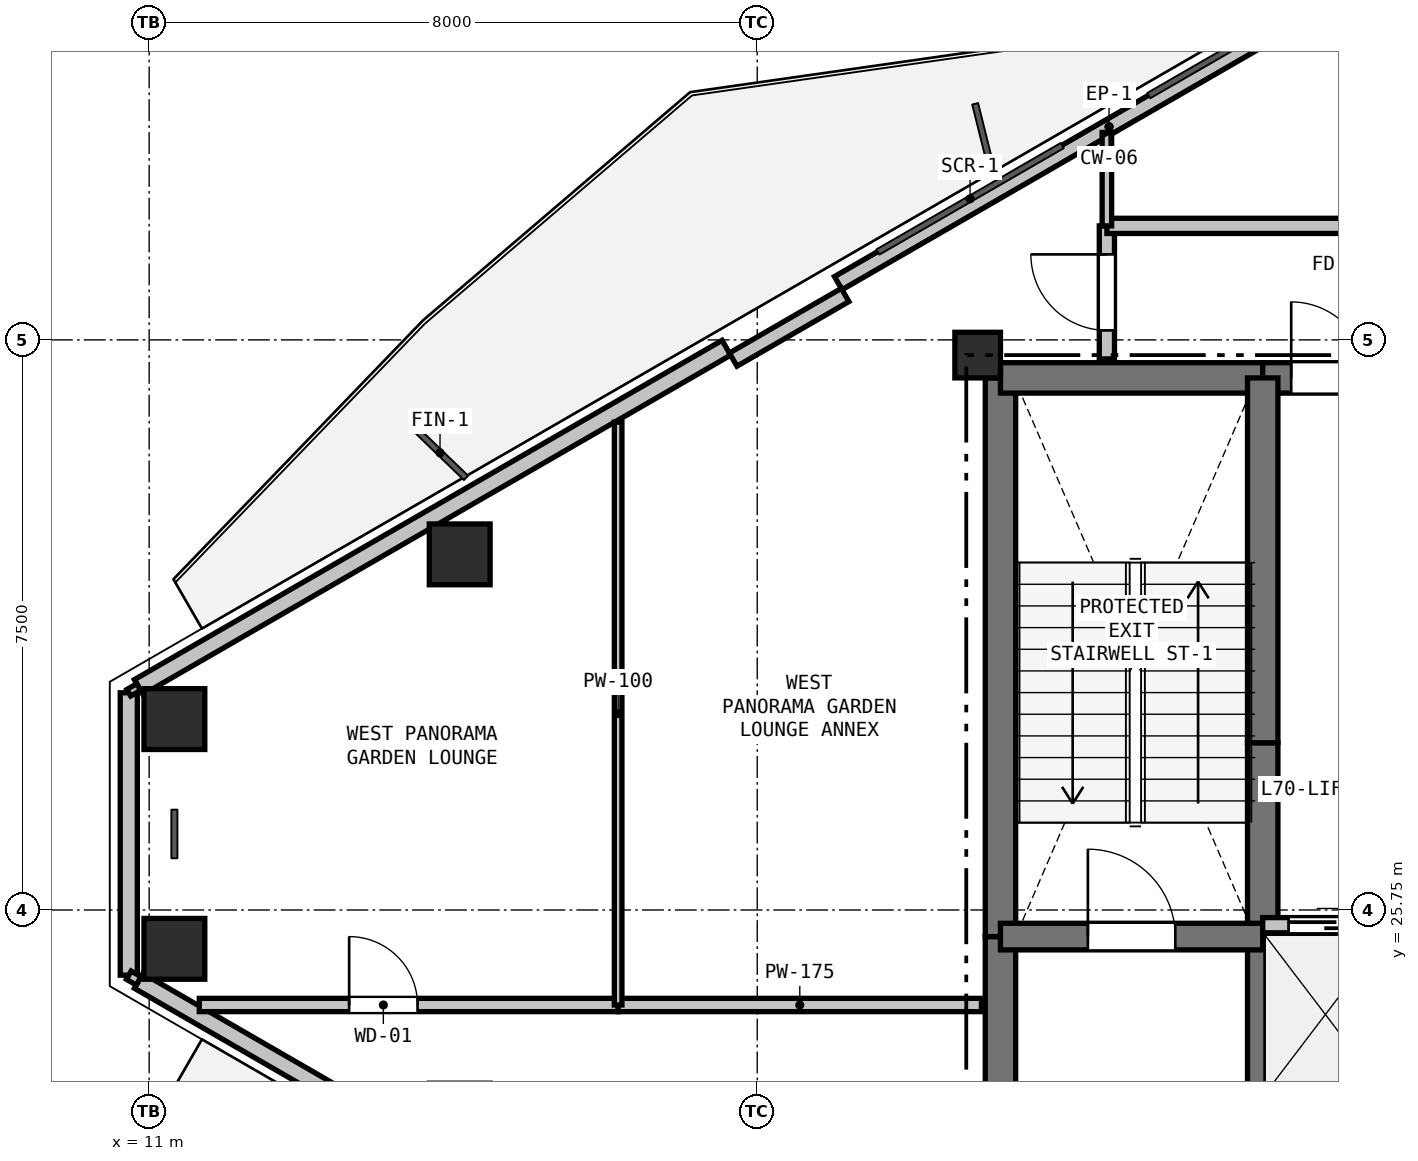
"""IFC4 building model, lengths in metres.
Left out: names, types, materials, properties, quantities, classifications, styles, units other than length and angle.
Written with IfcOpenShell. Run it as: python <this file> out.ifc"""

import sys

from ifc_helpers import new_model, si_unit, direction, frame, frame_2d, origin, origin_2d, place, context, subcontext, project, spatial, rectangle, hollow_rectangle, extrude, element, fill, save


model = new_model("IFC4")
c1 = context("Model", 3, precision=1e-05, world=origin(), true_north=direction((0.0, 1.0)))
c2 = subcontext(c1, "Body", "Model", "MODEL_VIEW")
j1 = project(units=[si_unit("LENGTHUNIT", "METRE"), si_unit("PLANEANGLEUNIT", "RADIAN")], contexts=[c1])
p1 = place(None, origin())
s1 = spatial("IfcSite", under=j1, at=p1, CompositionType="ELEMENT")
p2 = place(p1, origin())
s2 = spatial("IfcBuilding", under=s1, at=p2, CompositionType="ELEMENT")
p3 = place(p2, frame((0.0, 0.0, 249.6)))
s3 = spatial("IfcBuildingStorey", under=s2, at=p3, CompositionType="ELEMENT", Elevation=249.6)
p4 = place(p3, frame((21.9, 33.05, 0.0), z_axis=(0.0, 0.0, 1.0), x_axis=(1.0, 0.0, 0.0)))
e1 = element("IfcColumn", 1, at=p4, inside=s3, PredefinedType="COLUMN", context=c2, shape_type="SweptSolid", body=[
    extrude(rectangle(XDim=0.6, YDim=0.6, at=origin_2d()), origin(), (0.0, 0.0, 1.0), 4.5),
])
for number, where, z_axis, x_axis in (
    (2, (11.332, 28.261, 0.0), (0.0, 0.0, 1.0), (1.0, 0.0, 0.0)),
    (3, (15.086, 30.428, 0.0), (0.0, 0.0, 1.0), (1.0, 0.0, 0.0)),
    (4, (11.332, 25.239, 0.0), (0.0, 0.0, 1.0), (1.0, 0.0, 0.0)),
):
    element("IfcColumn", number, at=place(p3, frame(where, z_axis=z_axis, x_axis=x_axis)), inside=s3, PredefinedType="COLUMN", context=c2, shape_type="SweptSolid", body=[
        extrude(hollow_rectangle(XDim=0.8, YDim=0.8, WallThickness=0.025, at=origin_2d()), origin(), (0.0, 0.0, 1.0), 4.5),
    ])
p5 = place(p3, frame((10.732, 24.892, 0.0), z_axis=(0.0, 0.0, 1.0), x_axis=(0.0, 1.0, 0.0)))
e5 = element("IfcWall", 5, at=p5, inside=s3, PredefinedType="SOLIDWALL", context=c2, shape_type="SweptSolid", body=[
    extrude(rectangle(XDim=3.715, YDim=0.225, at=frame_2d((1.858, 0.0))), origin(), (0.0, 0.0, 1.0), 3.84),
])
p6 = place(p3, frame((10.862, 28.683, 0.0), z_axis=(0.0, 0.0, 1.0), x_axis=(0.866026655105, 0.499997832642, 0.0)))
e6 = element("IfcWall", 6, at=p6, inside=s3, PredefinedType="SOLIDWALL", context=c2, shape_type="SweptSolid", body=[
    extrude(rectangle(XDim=8.928, YDim=0.225, at=frame_2d((4.464, 0.0))), origin(), (0.0, 0.0, 1.0), 3.84),
])
p7 = place(p3, frame((20.066, 33.997, 0.0), z_axis=(0.0, 0.0, 1.0), x_axis=(0.866019557082, 0.500010126649, 0.0)))
e7 = element("IfcWall", 7, at=p7, inside=s3, PredefinedType="PARAPET", context=c2, shape_type="SweptSolid", body=[
    extrude(rectangle(XDim=8.228, YDim=0.2, at=frame_2d((4.114, 0.0))), origin(), (0.0, 0.0, 1.0), 0.2),
])
p8 = place(p3, frame((18.684, 32.991, 0.0), z_axis=(0.0, 0.0, 1.0), x_axis=(0.866025371046, 0.500000056704, 0.0)))
e8 = element("IfcWall", 8, at=p8, inside=s3, PredefinedType="PARAPET", context=c2, shape_type="SweptSolid", body=[
    extrude(rectangle(XDim=1.7, YDim=0.2, at=frame_2d((0.85, 0.0))), origin(), (0.0, 0.0, 1.0), 3.84),
])
p9 = place(p3, frame((18.594, 20.354, 0.0), z_axis=(0.0, 0.0, 1.0), x_axis=(-0.866026655105, 0.499997832642, 0.0)))
e9 = element("IfcWall", 9, at=p9, inside=s3, PredefinedType="SOLIDWALL", context=c2, shape_type="SweptSolid", body=[
    extrude(rectangle(XDim=8.928, YDim=0.225, at=frame_2d((4.464, 0.0))), origin(), (0.0, 0.0, 1.0), 3.84),
])
p10 = place(p3, frame((22.2, 20.75, 0.0), z_axis=(0.0, 0.0, 1.0), x_axis=(0.0, 1.0, 0.0)))
e10 = element("IfcWall", 10, at=p10, inside=s3, PredefinedType="SHEAR", context=c2, shape_type="SweptSolid", body=[
    extrude(rectangle(XDim=4.65, YDim=0.4, at=frame_2d((2.325, 0.0))), origin(), (0.0, 0.0, 1.0), 4.22),
])
p11 = place(p3, frame((22.2, 25.4, 0.0), z_axis=(0.0, 0.0, 1.0), x_axis=(0.0, 1.0, 0.0)))
e11 = element("IfcWall", 11, at=p11, inside=s3, PredefinedType="SHEAR", context=c2, shape_type="SweptSolid", body=[
    extrude(rectangle(XDim=7.35, YDim=0.4, at=frame_2d((3.675, 0.0))), origin(), (0.0, 0.0, 1.0), 4.22),
])
p12 = place(p3, frame((22.2, 32.75, 0.0), z_axis=(0.0, 0.0, 1.0), x_axis=(1.0, 0.0, 0.0)))
e12 = element("IfcWall", 12, at=p12, inside=s3, PredefinedType="SHEAR", context=c2, shape_type="SweptSolid", body=[
    extrude(rectangle(XDim=3.45, YDim=0.4, at=frame_2d((1.725, 0.0))), origin(), (0.0, 0.0, 1.0), 4.22),
])
p13 = place(p3, frame((25.65, 32.75, 0.0), z_axis=(0.0, 0.0, 1.0), x_axis=(1.0, 0.0, 0.0)))
e13 = element("IfcWall", 13, at=p13, inside=s3, PredefinedType="SHEAR", context=c2, shape_type="SweptSolid", body=[
    extrude(rectangle(XDim=1.75, YDim=0.4, at=frame_2d((0.875, 0.0))), origin(), (0.0, 0.0, 1.0), 4.22),
])
p14 = place(p13, frame((0.375, 0.0, 0.0)))
e14 = element("IfcOpeningElement", 14, at=p14, cuts=e13, PredefinedType="OPENING", context=c2, shape_type="SweptSolid", body=[
    extrude(rectangle(XDim=1.0, YDim=2.15, at=frame_2d((0.5, 1.075))), frame((0.0, 0.21, 0.0), z_axis=(0.0, -1.0, 0.0), x_axis=(1.0, 0.0, 0.0)), (0.0, 0.0, 1.0), 0.42),
])
p15 = place(p3, frame((25.65, 22.75, 0.0), z_axis=(0.0, 0.0, 1.0), x_axis=(0.0, 1.0, 0.0)))
e15 = element("IfcWall", 15, at=p15, inside=s3, PredefinedType="SHEAR", context=c2, shape_type="SweptSolid", body=[
    extrude(rectangle(XDim=2.8, YDim=0.4, at=frame_2d((1.4, 0.0))), origin(), (0.0, 0.0, 1.0), 4.22),
])
p16 = place(p3, frame((25.65, 25.55, 0.0), z_axis=(0.0, 0.0, 1.0), x_axis=(0.0, 1.0, 0.0)))
e16 = element("IfcWall", 16, at=p16, inside=s3, PredefinedType="SHEAR", context=c2, shape_type="SweptSolid", body=[
    extrude(rectangle(XDim=2.4, YDim=0.4, at=frame_2d((1.2, 0.0))), origin(), (0.0, 0.0, 1.0), 4.22),
])
p17 = place(p3, frame((25.65, 27.95, 0.0), z_axis=(0.0, 0.0, 1.0), x_axis=(0.0, 1.0, 0.0)))
e17 = element("IfcWall", 17, at=p17, inside=s3, PredefinedType="SHEAR", context=c2, shape_type="SweptSolid", body=[
    extrude(rectangle(XDim=4.8, YDim=0.4, at=frame_2d((2.4, 0.0))), origin(), (0.0, 0.0, 1.0), 4.22),
])
p18 = place(p3, frame((22.2, 25.4, 0.0), z_axis=(0.0, 0.0, 1.0), x_axis=(1.0, 0.0, 0.0)))
e18 = element("IfcWall", 18, at=p18, inside=s3, PredefinedType="SHEAR", context=c2, shape_type="SweptSolid", body=[
    extrude(rectangle(XDim=3.45, YDim=0.35, at=frame_2d((1.725, 0.0))), origin(), (0.0, 0.0, 1.0), 4.22),
])
p19 = place(p18, frame((1.15, 0.0, 0.0)))
e19 = element("IfcOpeningElement", 19, at=p19, cuts=e18, PredefinedType="OPENING", context=c2, shape_type="SweptSolid", body=[
    extrude(rectangle(XDim=1.15, YDim=2.15, at=frame_2d((0.575, 1.075))), frame((0.0, 0.185, 0.0), z_axis=(0.0, -1.0, 0.0), x_axis=(1.0, 0.0, 0.0)), (0.0, 0.0, 1.0), 0.37),
])
p20 = place(p3, frame((25.65, 25.55, 0.0), z_axis=(0.0, 0.0, 1.0), x_axis=(1.0, 0.0, 0.0)))
e20 = element("IfcWall", 20, at=p20, inside=s3, PredefinedType="PARTITIONING", context=c2, shape_type="SweptSolid", body=[
    extrude(rectangle(XDim=4.95, YDim=0.2, at=frame_2d((2.475, 0.0))), origin(), (0.0, 0.0, 1.0), 4.22),
])
p21 = place(p20, frame((0.34, 0.0, 0.0)))
e21 = element("IfcOpeningElement", 21, at=p21, cuts=e20, PredefinedType="OPENING", context=c2, shape_type="SweptSolid", body=[
    extrude(rectangle(XDim=1.1, YDim=2.15, at=frame_2d((0.55, 1.075))), frame((0.0, 0.11, 0.0), z_axis=(0.0, -1.0, 0.0), x_axis=(1.0, 0.0, 0.0)), (0.0, 0.0, 1.0), 0.22),
])
p22 = place(p20, frame((1.99, 0.0, 0.0)))
e22 = element("IfcOpeningElement", 22, at=p22, cuts=e20, PredefinedType="OPENING", context=c2, shape_type="SweptSolid", body=[
    extrude(rectangle(XDim=1.1, YDim=2.15, at=frame_2d((0.55, 1.075))), frame((0.0, 0.11, 0.0), z_axis=(0.0, -1.0, 0.0), x_axis=(1.0, 0.0, 0.0)), (0.0, 0.0, 1.0), 0.22),
])
p23 = place(p20, frame((3.64, 0.0, 0.0)))
e23 = element("IfcOpeningElement", 23, at=p23, cuts=e20, PredefinedType="OPENING", context=c2, shape_type="SweptSolid", body=[
    extrude(rectangle(XDim=1.1, YDim=2.15, at=frame_2d((0.55, 1.075))), frame((0.0, 0.11, 0.0), z_axis=(0.0, -1.0, 0.0), x_axis=(1.0, 0.0, 0.0)), (0.0, 0.0, 1.0), 0.22),
])
p24 = place(p3, frame((23.6, 33.0, 0.0), z_axis=(0.0, 0.0, 1.0), x_axis=(0.0, 1.0, 0.0)))
e24 = element("IfcWall", 24, at=p24, inside=s3, PredefinedType="PARTITIONING", context=c2, shape_type="SweptSolid", body=[
    extrude(rectangle(XDim=1.75, YDim=0.2, at=frame_2d((0.875, 0.0))), origin(), (0.0, 0.0, 1.0), 3.745),
])
p25 = place(p24, frame((0.375, 0.0, 0.0)))
e25 = element("IfcOpeningElement", 25, at=p25, cuts=e24, PredefinedType="OPENING", context=c2, shape_type="SweptSolid", body=[
    extrude(rectangle(XDim=1.0, YDim=2.15, at=frame_2d((0.5, 1.075))), frame((0.0, 0.11, 0.0), z_axis=(0.0, -1.0, 0.0), x_axis=(1.0, 0.0, 0.0)), (0.0, 0.0, 1.0), 0.22),
])
p26 = place(p3, frame((23.6, 34.75, 0.0), z_axis=(0.0, 0.0, 1.0), x_axis=(1.0, 0.0, 0.0)))
e26 = element("IfcWall", 26, at=p26, inside=s3, PredefinedType="PARTITIONING", context=c2, shape_type="SweptSolid", body=[
    extrude(rectangle(XDim=7.2, YDim=0.2, at=frame_2d((3.6, 0.0))), origin(), (0.0, 0.0, 1.0), 4.22),
])
p27 = place(p26, frame((3.1, 0.0, 0.0)))
e27 = element("IfcOpeningElement", 27, at=p27, cuts=e26, PredefinedType="OPENING", context=c2, shape_type="SweptSolid", body=[
    extrude(rectangle(XDim=1.0, YDim=2.15, at=frame_2d((0.5, 1.075))), frame((0.0, 0.11, 0.0), z_axis=(0.0, -1.0, 0.0), x_axis=(1.0, 0.0, 0.0)), (0.0, 0.0, 1.0), 0.22),
])
p28 = place(p3, frame((11.66, 24.5, 0.0), z_axis=(0.0, 0.0, 1.0), x_axis=(1.0, 0.0, 0.0)))
e28 = element("IfcWall", 28, at=p28, inside=s3, PredefinedType="PLUMBINGWALL", context=c2, shape_type="SweptSolid", body=[
    extrude(rectangle(XDim=5.51, YDim=0.175, at=frame_2d((2.755, 0.0))), origin(), (0.0, 0.0, 1.0), 3.668),
])
p29 = place(p28, frame((1.971, 0.0, 0.0)))
e29 = element("IfcOpeningElement", 29, at=p29, cuts=e28, PredefinedType="OPENING", context=c2, shape_type="SweptSolid", body=[
    extrude(rectangle(XDim=0.9, YDim=2.1, at=frame_2d((0.45, 1.05))), frame((0.0, 0.097, 0.0), z_axis=(0.0, -1.0, 0.0), x_axis=(1.0, 0.0, 0.0)), (0.0, 0.0, 1.0), 0.195),
])
p30 = place(p3, frame((17.17, 24.5, 0.0), z_axis=(0.0, 0.0, 1.0), x_axis=(1.0, 0.0, 0.0)))
e30 = element("IfcWall", 30, at=p30, inside=s3, PredefinedType="PLUMBINGWALL", context=c2, shape_type="SweptSolid", body=[
    extrude(rectangle(XDim=4.78, YDim=0.175, at=frame_2d((2.39, 0.0))), origin(), (0.0, 0.0, 1.0), 3.745),
])
p31 = place(p3, frame((23.6, 34.75, 0.0), z_axis=(0.0, 0.0, 1.0), x_axis=(0.0, 1.0, 0.0)))
e31 = element("IfcWall", 31, at=p31, inside=s3, PredefinedType="PARTITIONING", context=c2, shape_type="SweptSolid", body=[
    extrude(rectangle(XDim=1.229, YDim=0.125, at=frame_2d((0.615, 0.0))), origin(), (0.0, 0.0, 1.0), 2.365),
])
p32 = place(p3, frame((17.17, 32.167, 0.0), z_axis=(0.0, 0.0, 1.0), x_axis=(0.0, -1.0, 0.0)))
e32 = element("IfcWall", 32, at=p32, inside=s3, PredefinedType="PARTITIONING", context=c2, shape_type="SweptSolid", body=[
    extrude(rectangle(XDim=7.667, YDim=0.1, at=frame_2d((3.833, 0.0))), origin(), (0.0, 0.0, 1.0), 2.365),
])
p33 = place(p3, frame((10.862, 24.817, 0.0), z_axis=(0.0, 0.0, 1.0), x_axis=(-0.866131372301, 0.499816412211, 0.0)))
e33 = element("IfcWall", 33, at=p33, inside=s3, PredefinedType="PARTITIONING", context=c2, shape_type="SweptSolid", body=[
    extrude(rectangle(XDim=0.15, YDim=0.125, at=frame_2d((0.075, 0.0))), origin(), (0.0, 0.0, 1.0), 4.22),
])
p34 = place(p3, frame((10.732, 28.608, 0.0), z_axis=(0.0, 0.0, 1.0), x_axis=(0.866131372301, 0.499816412211, 0.0)))
e34 = element("IfcWall", 34, at=p34, inside=s3, PredefinedType="PARTITIONING", context=c2, shape_type="SweptSolid", body=[
    extrude(rectangle(XDim=0.15, YDim=0.1, at=frame_2d((0.075, 0.0))), origin(), (0.0, 0.0, 1.0), 4.22),
])
p35 = place(p21, origin())
e35 = element("IfcDoor", 35, at=p35, inside=s3, OperationType="SLIDING_TO_LEFT", PredefinedType="DOOR", context=c2, shape_type="SweptSolid", body=[
    extrude(rectangle(XDim=1.1, YDim=2.15, at=frame_2d((0.55, 1.075))), frame((0.0, 0.025, 0.0), z_axis=(0.0, -1.0, 0.0), x_axis=(1.0, 0.0, 0.0)), (0.0, 0.0, 1.0), 0.05),
])
fill(e21, e35)
p36 = place(p14, origin())
e36 = element("IfcDoor", 36, at=p36, inside=s3, OperationType="SINGLE_SWING_LEFT", PredefinedType="DOOR", context=c2, shape_type="SweptSolid", body=[
    extrude(rectangle(XDim=1.0, YDim=2.15, at=frame_2d((0.5, 1.075))), frame((0.0, 0.025, 0.0), z_axis=(0.0, -1.0, 0.0), x_axis=(1.0, 0.0, 0.0)), (0.0, 0.0, 1.0), 0.05),
])
fill(e14, e36)
p37 = place(p19, origin())
e37 = element("IfcDoor", 37, at=p37, inside=s3, OperationType="SINGLE_SWING_LEFT", PredefinedType="DOOR", context=c2, shape_type="SweptSolid", body=[
    extrude(rectangle(XDim=1.15, YDim=2.15, at=frame_2d((0.575, 1.075))), frame((0.0, 0.025, 0.0), z_axis=(0.0, -1.0, 0.0), x_axis=(1.0, 0.0, 0.0)), (0.0, 0.0, 1.0), 0.05),
])
fill(e19, e37)
p38 = place(p25, origin())
e38 = element("IfcDoor", 38, at=p38, inside=s3, OperationType="SINGLE_SWING_RIGHT", PredefinedType="DOOR", context=c2, shape_type="SweptSolid", body=[
    extrude(rectangle(XDim=1.0, YDim=2.15, at=frame_2d((0.5, 1.075))), frame((0.0, 0.025, 0.0), z_axis=(0.0, -1.0, 0.0), x_axis=(1.0, 0.0, 0.0)), (0.0, 0.0, 1.0), 0.05),
])
fill(e25, e38)
p39 = place(p29, origin())
e39 = element("IfcDoor", 39, at=p39, inside=s3, OperationType="SINGLE_SWING_LEFT", PredefinedType="DOOR", context=c2, shape_type="SweptSolid", body=[
    extrude(rectangle(XDim=0.9, YDim=2.1, at=frame_2d((0.45, 1.05))), frame((0.0, 0.025, 0.0), z_axis=(0.0, -1.0, 0.0), x_axis=(1.0, 0.0, 0.0)), (0.0, 0.0, 1.0), 0.05),
])
fill(e29, e39)
save(model, sys.argv[1])
